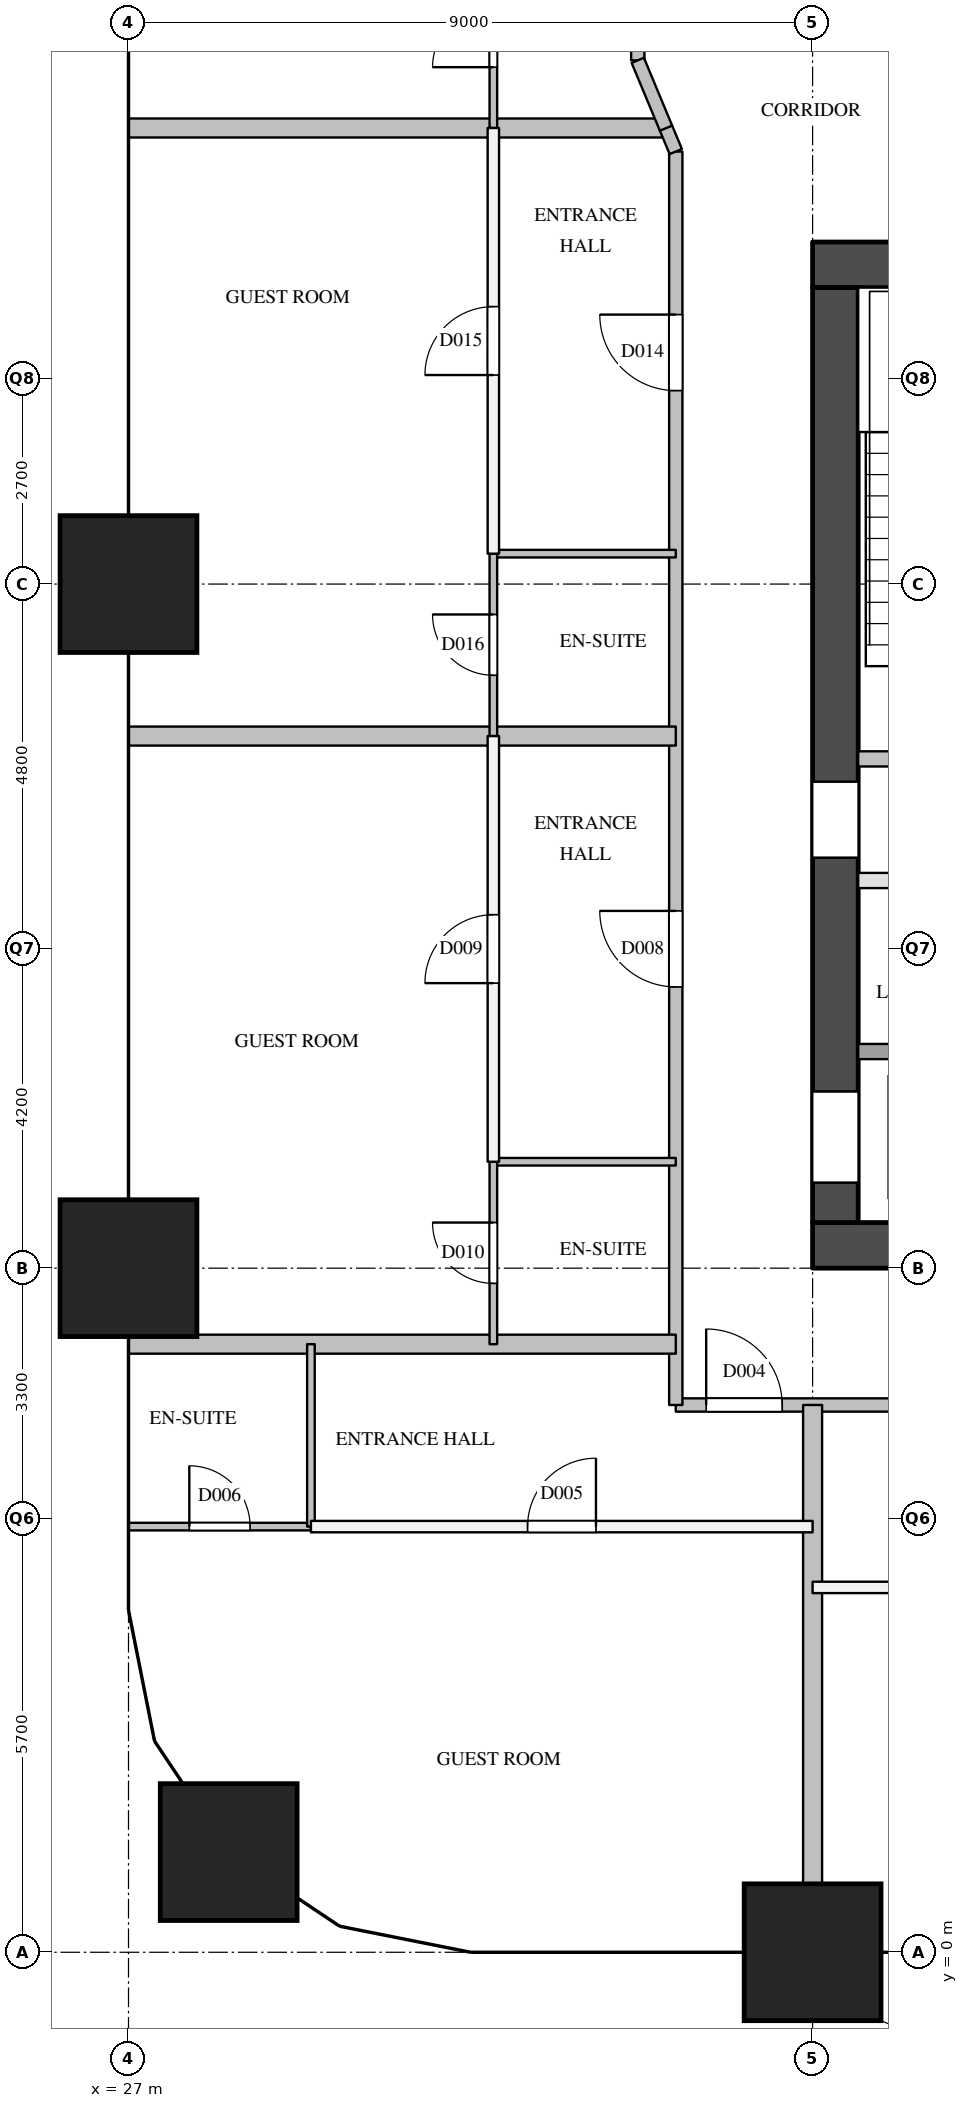
"""IFC4 building model, lengths in metres.
Left out: names, types, materials, properties, quantities, classifications, styles, units other than length and angle.
Written with IfcOpenShell. Run it as: python <this file> out.ifc"""

import sys

from ifc_helpers import new_model, si_unit, direction, frame, frame_2d, origin, origin_2d, place, context, subcontext, project, spatial, rectangle, extrude, element, fill, save


model = new_model("IFC4")
c1 = context("Model", 3, precision=1e-05, world=origin(), true_north=direction((0.0, 1.0)))
c2 = subcontext(c1, "Body", "Model", "MODEL_VIEW")
j1 = project(units=[si_unit("LENGTHUNIT", "METRE"), si_unit("PLANEANGLEUNIT", "RADIAN")], contexts=[c1])
p1 = place(None, origin())
s1 = spatial("IfcSite", under=j1, at=p1, CompositionType="ELEMENT")
p2 = place(p1, origin())
s2 = spatial("IfcBuilding", under=s1, at=p2, CompositionType="ELEMENT")
p3 = place(p2, frame((0.0, 0.0, 108.2)))
s3 = spatial("IfcBuildingStorey", under=s2, at=p3, CompositionType="ELEMENT", Elevation=108.2)
for number, where, z_axis, x_axis in (
    (1, (28.318, 1.318, 0.0), (0.0, 0.0, 1.0), (1.0, 0.0, 0.0)),
    (2, (27.0, 9.0, 0.0), (0.0, 0.0, 1.0), (1.0, 0.0, 0.0)),
    (3, (27.0, 18.0, 0.0), (0.0, 0.0, 1.0), (1.0, 0.0, 0.0)),
    (4, (36.0, 0.0, 0.0), (0.0, 0.0, 1.0), (1.0, 0.0, 0.0)),
):
    element("IfcColumn", number, at=place(p3, frame(where, z_axis=z_axis, x_axis=x_axis)), inside=s3, PredefinedType="COLUMN", context=c2, shape_type="SweptSolid", body=[
        extrude(rectangle(XDim=1.8, YDim=1.8, at=origin_2d()), origin(), (0.0, 0.0, 1.0), 3.8),
    ])
for number, where, z_axis, x_axis in (
    (5, (36.0, 9.3, 0.0), (0.0, 0.0, 1.0), (1.0, 0.0, 0.0)),
    (6, (36.0, 22.2, 0.0), (0.0, 0.0, 1.0), (1.0, 0.0, 0.0)),
):
    element("IfcWall", number, at=place(p3, frame(where, z_axis=z_axis, x_axis=x_axis)), inside=s3, PredefinedType="SHEAR", context=c2, shape_type="SweptSolid", body=[
        extrude(rectangle(XDim=9.0, YDim=0.6, at=frame_2d((4.5, 0.0))), origin(), (0.0, 0.0, 1.0), 3.5),
    ])
p4 = place(p3, frame((36.3, 9.6, 0.0), z_axis=(0.0, 0.0, 1.0), x_axis=(0.0, 1.0, 0.0)))
e7 = element("IfcWall", 7, at=p4, inside=s3, PredefinedType="SHEAR", context=c2, shape_type="SweptSolid", body=[
    extrude(rectangle(XDim=12.3, YDim=0.6, at=frame_2d((6.15, 0.0))), origin(), (0.0, 0.0, 1.0), 3.5),
])
p5 = place(p4, frame((0.525, 0.0, 0.0)))
e8 = element("IfcOpeningElement", 8, at=p5, cuts=e7, PredefinedType="OPENING", context=c2, shape_type="SweptSolid", body=[
    extrude(rectangle(XDim=1.2, YDim=2.1, at=frame_2d((0.6, 1.05))), frame((0.0, 0.31, 0.0), z_axis=(0.0, -1.0, 0.0), x_axis=(1.0, 0.0, 0.0)), (0.0, 0.0, 1.0), 0.62),
])
p6 = place(p4, frame((4.8, 0.0, 0.0)))
e9 = element("IfcOpeningElement", 9, at=p6, cuts=e7, PredefinedType="OPENING", context=c2, shape_type="SweptSolid", body=[
    extrude(rectangle(XDim=1.0, YDim=2.1, at=frame_2d((0.5, 1.05))), frame((0.0, 0.31, 0.0), z_axis=(0.0, -1.0, 0.0), x_axis=(1.0, 0.0, 0.0)), (0.0, 0.0, 1.0), 0.62),
])
p7 = place(p3, frame((36.6, 11.85, 0.0), z_axis=(0.0, 0.0, 1.0), x_axis=(1.0, 0.0, 0.0)))
e10 = element("IfcWall", 10, at=p7, inside=s3, PredefinedType="SOLIDWALL", context=c2, shape_type="SweptSolid", body=[
    extrude(rectangle(XDim=7.8, YDim=0.2, at=frame_2d((3.9, 0.0))), origin(), (0.0, 0.0, 1.0), 3.5),
])
p8 = place(p3, frame((36.6, 14.1, 0.0), z_axis=(0.0, 0.0, 1.0), x_axis=(1.0, 0.0, 0.0)))
e11 = element("IfcWall", 11, at=p8, inside=s3, PredefinedType="PARTITIONING", context=c2, shape_type="SweptSolid", body=[
    extrude(rectangle(XDim=6.0, YDim=0.2, at=frame_2d((3.0, 0.0))), origin(), (0.0, 0.0, 1.0), 3.5),
])
p9 = place(p8, frame((0.9, 0.0, 0.0)))
e12 = element("IfcOpeningElement", 12, at=p9, cuts=e11, PredefinedType="OPENING", context=c2, shape_type="SweptSolid", body=[
    extrude(rectangle(XDim=0.9, YDim=2.1, at=frame_2d((0.45, 1.05))), frame((0.0, 0.11, 0.0), z_axis=(0.0, -1.0, 0.0), x_axis=(1.0, 0.0, 0.0)), (0.0, 0.0, 1.0), 0.22),
])
p10 = place(p8, frame((3.9, 0.0, 0.0)))
e13 = element("IfcOpeningElement", 13, at=p10, cuts=e11, PredefinedType="OPENING", context=c2, shape_type="SweptSolid", body=[
    extrude(rectangle(XDim=0.9, YDim=2.1, at=frame_2d((0.45, 1.05))), frame((0.0, 0.11, 0.0), z_axis=(0.0, -1.0, 0.0), x_axis=(1.0, 0.0, 0.0)), (0.0, 0.0, 1.0), 0.22),
])
p11 = place(p3, frame((36.6, 15.7, 0.0), z_axis=(0.0, 0.0, 1.0), x_axis=(1.0, 0.0, 0.0)))
e14 = element("IfcWall", 14, at=p11, inside=s3, PredefinedType="SOLIDWALL", context=c2, shape_type="SweptSolid", body=[
    extrude(rectangle(XDim=6.3, YDim=0.2, at=frame_2d((3.15, 0.0))), origin(), (0.0, 0.0, 1.0), 3.5),
])
p12 = place(p11, frame((1.025, 0.0, 0.0)))
e15 = element("IfcOpeningElement", 15, at=p12, cuts=e14, PredefinedType="OPENING", context=c2, shape_type="SweptSolid", body=[
    extrude(rectangle(XDim=1.1, YDim=2.1, at=frame_2d((0.55, 1.05))), frame((0.0, 0.11, 0.0), z_axis=(0.0, -1.0, 0.0), x_axis=(1.0, 0.0, 0.0)), (0.0, 0.0, 1.0), 0.22),
])
p13 = place(p11, frame((4.175, 0.0, 0.0)))
e16 = element("IfcOpeningElement", 16, at=p13, cuts=e14, PredefinedType="OPENING", context=c2, shape_type="SweptSolid", body=[
    extrude(rectangle(XDim=1.1, YDim=2.1, at=frame_2d((0.55, 1.05))), frame((0.0, 0.11, 0.0), z_axis=(0.0, -1.0, 0.0), x_axis=(1.0, 0.0, 0.0)), (0.0, 0.0, 1.0), 0.22),
])
p14 = place(p3, frame((34.2, 7.2, 0.0), z_axis=(0.0, 0.0, 1.0), x_axis=(1.0, 0.0, 0.0)))
e17 = element("IfcWall", 17, at=p14, inside=s3, PredefinedType="PARTITIONING", context=c2, shape_type="SweptSolid", body=[
    extrude(rectangle(XDim=12.6, YDim=0.175, at=frame_2d((6.3, 0.0))), origin(), (0.0, 0.0, 1.0), 3.5),
])
p15 = place(p14, frame((4.1, 0.0, 0.0)))
e18 = element("IfcOpeningElement", 18, at=p15, cuts=e17, PredefinedType="OPENING", context=c2, shape_type="SweptSolid", body=[
    extrude(rectangle(XDim=1.0, YDim=2.1, at=frame_2d((0.5, 1.05))), frame((0.0, 0.097, 0.0), z_axis=(0.0, -1.0, 0.0), x_axis=(1.0, 0.0, 0.0)), (0.0, 0.0, 1.0), 0.195),
])
p16 = place(p14, frame((0.4, 0.0, 0.0)))
e19 = element("IfcOpeningElement", 19, at=p16, cuts=e17, PredefinedType="OPENING", context=c2, shape_type="SweptSolid", body=[
    extrude(rectangle(XDim=1.0, YDim=2.1, at=frame_2d((0.5, 1.05))), frame((0.0, 0.097, 0.0), z_axis=(0.0, -1.0, 0.0), x_axis=(1.0, 0.0, 0.0)), (0.0, 0.0, 1.0), 0.195),
])
p17 = place(p3, frame((33.7, 24.89, 0.0), z_axis=(0.0, 0.0, 1.0), x_axis=(0.0, 1.0, 0.0)))
e20 = element("IfcWall", 20, at=p17, inside=s3, PredefinedType="PARTITIONING", context=c2, shape_type="SweptSolid", body=[
    extrude(rectangle(XDim=3.03, YDim=0.175, at=frame_2d((1.515, 0.0))), origin(), (0.0, 0.0, 1.0), 2.5),
])
p18 = place(p3, frame((34.2, 7.2, 0.0), z_axis=(0.0, 0.0, 1.0), x_axis=(0.0, 1.0, 0.0)))
e21 = element("IfcWall", 21, at=p18, inside=s3, PredefinedType="PARTITIONING", context=c2, shape_type="SweptSolid", body=[
    extrude(rectangle(XDim=16.49, YDim=0.175, at=frame_2d((8.245, 0.0))), origin(), (0.0, 0.0, 1.0), 3.5),
])
p19 = place(p18, frame((5.5, 0.0, 0.0)))
e22 = element("IfcOpeningElement", 22, at=p19, cuts=e21, PredefinedType="OPENING", context=c2, shape_type="SweptSolid", body=[
    extrude(rectangle(XDim=1.0, YDim=2.1, at=frame_2d((0.5, 1.05))), frame((0.0, 0.097, 0.0), z_axis=(0.0, -1.0, 0.0), x_axis=(1.0, 0.0, 0.0)), (0.0, 0.0, 1.0), 0.195),
])
p20 = place(p18, frame((13.345, 0.0, 0.0)))
e23 = element("IfcOpeningElement", 23, at=p20, cuts=e21, PredefinedType="OPENING", context=c2, shape_type="SweptSolid", body=[
    extrude(rectangle(XDim=1.0, YDim=2.1, at=frame_2d((0.5, 1.05))), frame((0.0, 0.097, 0.0), z_axis=(0.0, -1.0, 0.0), x_axis=(1.0, 0.0, 0.0)), (0.0, 0.0, 1.0), 0.195),
])
p21 = place(p3, frame((36.0, 4.8, 0.0), z_axis=(0.0, 0.0, 1.0), x_axis=(1.0, 0.0, 0.0)))
e24 = element("IfcWall", 24, at=p21, inside=s3, PredefinedType="PARTITIONING", context=c2, shape_type="SweptSolid", body=[
    extrude(rectangle(XDim=5.6, YDim=0.15, at=frame_2d((2.8, 0.0))), origin(), (0.0, 0.0, 1.0), 3.5),
])
p22 = place(p21, frame((2.35, 0.0, 0.0)))
e25 = element("IfcOpeningElement", 25, at=p22, cuts=e24, PredefinedType="OPENING", context=c2, shape_type="SweptSolid", body=[
    extrude(rectangle(XDim=0.9, YDim=2.1, at=frame_2d((0.45, 1.05))), frame((0.0, 0.085, 0.0), z_axis=(0.0, -1.0, 0.0), x_axis=(1.0, 0.0, 0.0)), (0.0, 0.0, 1.0), 0.17),
])
p23 = place(p3, frame((29.4, 5.6, 0.0), z_axis=(0.0, 0.0, 1.0), x_axis=(1.0, 0.0, 0.0)))
e26 = element("IfcWall", 26, at=p23, inside=s3, PredefinedType="PARTITIONING", context=c2, shape_type="SweptSolid", body=[
    extrude(rectangle(XDim=6.6, YDim=0.15, at=frame_2d((3.3, 0.0))), origin(), (0.0, 0.0, 1.0), 3.5),
])
p24 = place(p23, frame((2.85, 0.0, 0.0)))
e27 = element("IfcOpeningElement", 27, at=p24, cuts=e26, PredefinedType="OPENING", context=c2, shape_type="SweptSolid", body=[
    extrude(rectangle(XDim=0.9, YDim=2.1, at=frame_2d((0.45, 1.05))), frame((0.0, 0.085, 0.0), z_axis=(0.0, -1.0, 0.0), x_axis=(1.0, 0.0, 0.0)), (0.0, 0.0, 1.0), 0.17),
])
p25 = place(p3, frame((31.8, 10.4, 0.0), z_axis=(0.0, 0.0, 1.0), x_axis=(0.0, 1.0, 0.0)))
e28 = element("IfcWall", 28, at=p25, inside=s3, PredefinedType="PARTITIONING", context=c2, shape_type="SweptSolid", body=[
    extrude(rectangle(XDim=5.6, YDim=0.15, at=frame_2d((2.8, 0.0))), origin(), (0.0, 0.0, 1.0), 3.5),
])
p26 = place(p25, frame((2.35, 0.0, 0.0)))
e29 = element("IfcOpeningElement", 29, at=p26, cuts=e28, PredefinedType="OPENING", context=c2, shape_type="SweptSolid", body=[
    extrude(rectangle(XDim=0.9, YDim=2.1, at=frame_2d((0.45, 1.05))), frame((0.0, 0.085, 0.0), z_axis=(0.0, -1.0, 0.0), x_axis=(1.0, 0.0, 0.0)), (0.0, 0.0, 1.0), 0.17),
])
p27 = place(p3, frame((31.8, 18.4, 0.0), z_axis=(0.0, 0.0, 1.0), x_axis=(0.0, 1.0, 0.0)))
e30 = element("IfcWall", 30, at=p27, inside=s3, PredefinedType="PARTITIONING", context=c2, shape_type="SweptSolid", body=[
    extrude(rectangle(XDim=5.6, YDim=0.15, at=frame_2d((2.8, 0.0))), origin(), (0.0, 0.0, 1.0), 3.5),
])
p28 = place(p27, frame((2.35, 0.0, 0.0)))
e31 = element("IfcOpeningElement", 31, at=p28, cuts=e30, PredefinedType="OPENING", context=c2, shape_type="SweptSolid", body=[
    extrude(rectangle(XDim=0.9, YDim=2.1, at=frame_2d((0.45, 1.05))), frame((0.0, 0.085, 0.0), z_axis=(0.0, -1.0, 0.0), x_axis=(1.0, 0.0, 0.0)), (0.0, 0.0, 1.0), 0.17),
])
for number, where, z_axis, x_axis in (
    (32, (27.0, 8.0, 0.0), (0.0, 0.0, 1.0), (1.0, 0.0, 0.0)),
    (33, (27.0, 16.0, 0.0), (0.0, 0.0, 1.0), (1.0, 0.0, 0.0)),
):
    element("IfcWall", number, at=place(p3, frame(where, z_axis=z_axis, x_axis=x_axis)), inside=s3, PredefinedType="PARTITIONING", context=c2, shape_type="SweptSolid", body=[
        extrude(rectangle(XDim=7.2, YDim=0.25, at=frame_2d((3.6, 0.0))), origin(), (0.0, 0.0, 1.0), 2.5),
    ])
p29 = place(p3, frame((27.0, 24.0, 0.0), z_axis=(0.0, 0.0, 1.0), x_axis=(1.0, 0.0, 0.0)))
e34 = element("IfcWall", 34, at=p29, inside=s3, PredefinedType="PARTITIONING", context=c2, shape_type="SweptSolid", body=[
    extrude(rectangle(XDim=7.071, YDim=0.25, at=frame_2d((3.535, 0.0))), origin(), (0.0, 0.0, 1.0), 2.5),
])
p30 = place(p3, frame((36.0, 0.0, 0.0), z_axis=(0.0, 0.0, 1.0), x_axis=(0.0, 1.0, 0.0)))
e35 = element("IfcWall", 35, at=p30, inside=s3, PredefinedType="PARTITIONING", context=c2, shape_type="SweptSolid", body=[
    extrude(rectangle(XDim=7.2, YDim=0.25, at=frame_2d((3.6, 0.0))), origin(), (0.0, 0.0, 1.0), 3.5),
])
p31 = place(p3, frame((27.0, 5.6, 0.0), z_axis=(0.0, 0.0, 1.0), x_axis=(1.0, 0.0, 0.0)))
e36 = element("IfcWall", 36, at=p31, inside=s3, PredefinedType="PARTITIONING", context=c2, shape_type="SweptSolid", body=[
    extrude(rectangle(XDim=2.4, YDim=0.1, at=frame_2d((1.2, 0.0))), origin(), (0.0, 0.0, 1.0), 2.5),
])
p32 = place(p31, frame((0.8, 0.0, 0.0)))
e37 = element("IfcOpeningElement", 37, at=p32, cuts=e36, PredefinedType="OPENING", context=c2, shape_type="SweptSolid", body=[
    extrude(rectangle(XDim=0.8, YDim=2.1, at=frame_2d((0.4, 1.05))), frame((0.0, 0.06, 0.0), z_axis=(0.0, -1.0, 0.0), x_axis=(1.0, 0.0, 0.0)), (0.0, 0.0, 1.0), 0.12),
])
for number, where, z_axis, x_axis in (
    (38, (31.8, 10.4, 0.0), (0.0, 0.0, 1.0), (1.0, 0.0, 0.0)),
    (39, (31.8, 18.4, 0.0), (0.0, 0.0, 1.0), (1.0, 0.0, 0.0)),
    (40, (29.4, 5.6, 0.0), (0.0, 0.0, 1.0), (0.0, 1.0, 0.0)),
):
    element("IfcWall", number, at=place(p3, frame(where, z_axis=z_axis, x_axis=x_axis)), inside=s3, PredefinedType="PARTITIONING", context=c2, shape_type="SweptSolid", body=[
        extrude(rectangle(XDim=2.4, YDim=0.1, at=frame_2d((1.2, 0.0))), origin(), (0.0, 0.0, 1.0), 3.5),
    ])
p33 = place(p3, frame((31.8, 8.0, 0.0), z_axis=(0.0, 0.0, 1.0), x_axis=(0.0, 1.0, 0.0)))
e41 = element("IfcWall", 41, at=p33, inside=s3, PredefinedType="PARTITIONING", context=c2, shape_type="SweptSolid", body=[
    extrude(rectangle(XDim=2.4, YDim=0.1, at=frame_2d((1.2, 0.0))), origin(), (0.0, 0.0, 1.0), 3.5),
])
p34 = place(p33, frame((0.8, 0.0, 0.0)))
e42 = element("IfcOpeningElement", 42, at=p34, cuts=e41, PredefinedType="OPENING", context=c2, shape_type="SweptSolid", body=[
    extrude(rectangle(XDim=0.8, YDim=2.1, at=frame_2d((0.4, 1.05))), frame((0.0, 0.06, 0.0), z_axis=(0.0, -1.0, 0.0), x_axis=(1.0, 0.0, 0.0)), (0.0, 0.0, 1.0), 0.12),
])
p35 = place(p3, frame((31.8, 16.0, 0.0), z_axis=(0.0, 0.0, 1.0), x_axis=(0.0, 1.0, 0.0)))
e43 = element("IfcWall", 43, at=p35, inside=s3, PredefinedType="PARTITIONING", context=c2, shape_type="SweptSolid", body=[
    extrude(rectangle(XDim=2.4, YDim=0.1, at=frame_2d((1.2, 0.0))), origin(), (0.0, 0.0, 1.0), 3.5),
])
p36 = place(p35, frame((0.8, 0.0, 0.0)))
e44 = element("IfcOpeningElement", 44, at=p36, cuts=e43, PredefinedType="OPENING", context=c2, shape_type="SweptSolid", body=[
    extrude(rectangle(XDim=0.8, YDim=2.1, at=frame_2d((0.4, 1.05))), frame((0.0, 0.06, 0.0), z_axis=(0.0, -1.0, 0.0), x_axis=(1.0, 0.0, 0.0)), (0.0, 0.0, 1.0), 0.12),
])
p37 = place(p3, frame((31.8, 24.0, 0.0), z_axis=(0.0, 0.0, 1.0), x_axis=(0.0, 1.0, 0.0)))
e45 = element("IfcWall", 45, at=p37, inside=s3, PredefinedType="PARTITIONING", context=c2, shape_type="SweptSolid", body=[
    extrude(rectangle(XDim=2.4, YDim=0.1, at=frame_2d((1.2, 0.0))), origin(), (0.0, 0.0, 1.0), 3.5),
])
p38 = place(p37, frame((0.8, 0.0, 0.0)))
e46 = element("IfcOpeningElement", 46, at=p38, cuts=e45, PredefinedType="OPENING", context=c2, shape_type="SweptSolid", body=[
    extrude(rectangle(XDim=0.8, YDim=2.1, at=frame_2d((0.4, 1.05))), frame((0.0, 0.06, 0.0), z_axis=(0.0, -1.0, 0.0), x_axis=(1.0, 0.0, 0.0)), (0.0, 0.0, 1.0), 0.12),
])
p39 = place(p3, frame((34.2, 23.69, 0.0), z_axis=(0.0, 0.0, 1.0), x_axis=(-0.384307602557, 0.92320510539, 0.0)))
e47 = element("IfcWall", 47, at=p39, inside=s3, PredefinedType="PARTITIONING", context=c2, shape_type="SweptSolid", body=[
    extrude(rectangle(XDim=0.338, YDim=0.175, at=frame_2d((0.169, 0.0))), origin(), (0.0, 0.0, 1.0), 3.5),
])
p40 = place(p3, frame((34.072, 23.998, 0.0), z_axis=(0.0, 0.0, 1.0), x_axis=(-0.384687170746, 0.923047008913, 0.0)))
e48 = element("IfcWall", 48, at=p40, inside=s3, PredefinedType="PARTITIONING", context=c2, shape_type="SweptSolid", body=[
    extrude(rectangle(XDim=0.966, YDim=0.175, at=frame_2d((0.483, 0.0))), origin(), (0.0, 0.0, 1.0), 3.5),
])
p41 = place(p5, origin())
e49 = element("IfcDoor", 49, at=p41, inside=s3, OperationType="SLIDING_TO_LEFT", PredefinedType="DOOR", context=c2, shape_type="SweptSolid", body=[
    extrude(rectangle(XDim=1.2, YDim=2.1, at=frame_2d((0.6, 1.05))), frame((0.0, 0.025, 0.0), z_axis=(0.0, -1.0, 0.0), x_axis=(1.0, 0.0, 0.0)), (0.0, 0.0, 1.0), 0.05),
])
fill(e8, e49)
p42 = place(p6, origin())
e50 = element("IfcDoor", 50, at=p42, inside=s3, OperationType="SINGLE_SWING_LEFT", PredefinedType="DOOR", context=c2, shape_type="SweptSolid", body=[
    extrude(rectangle(XDim=1.0, YDim=2.1, at=frame_2d((0.5, 1.05))), frame((0.0, 0.025, 0.0), z_axis=(0.0, -1.0, 0.0), x_axis=(1.0, 0.0, 0.0)), (0.0, 0.0, 1.0), 0.05),
])
fill(e9, e50)
p43 = place(p16, origin())
e51 = element("IfcDoor", 51, at=p43, inside=s3, OperationType="SINGLE_SWING_LEFT", PredefinedType="DOOR", context=c2, shape_type="SweptSolid", body=[
    extrude(rectangle(XDim=1.0, YDim=2.1, at=frame_2d((0.5, 1.05))), frame((0.0, 0.025, 0.0), z_axis=(0.0, -1.0, 0.0), x_axis=(1.0, 0.0, 0.0)), (0.0, 0.0, 1.0), 0.05),
])
fill(e19, e51)
p44 = place(p24, origin())
e52 = element("IfcDoor", 52, at=p44, inside=s3, OperationType="SINGLE_SWING_RIGHT", PredefinedType="DOOR", context=c2, shape_type="SweptSolid", body=[
    extrude(rectangle(XDim=0.9, YDim=2.1, at=frame_2d((0.45, 1.05))), frame((0.0, 0.025, 0.0), z_axis=(0.0, -1.0, 0.0), x_axis=(1.0, 0.0, 0.0)), (0.0, 0.0, 1.0), 0.05),
])
fill(e27, e52)
p45 = place(p32, origin())
e53 = element("IfcDoor", 53, at=p45, inside=s3, OperationType="SINGLE_SWING_LEFT", PredefinedType="DOOR", context=c2, shape_type="SweptSolid", body=[
    extrude(rectangle(XDim=0.8, YDim=2.1, at=frame_2d((0.4, 1.05))), frame((0.0, 0.025, 0.0), z_axis=(0.0, -1.0, 0.0), x_axis=(1.0, 0.0, 0.0)), (0.0, 0.0, 1.0), 0.05),
])
fill(e37, e53)
p46 = place(p19, origin())
e54 = element("IfcDoor", 54, at=p46, inside=s3, OperationType="SINGLE_SWING_RIGHT", PredefinedType="DOOR", context=c2, shape_type="SweptSolid", body=[
    extrude(rectangle(XDim=1.0, YDim=2.1, at=frame_2d((0.5, 1.05))), frame((0.0, 0.025, 0.0), z_axis=(0.0, -1.0, 0.0), x_axis=(1.0, 0.0, 0.0)), (0.0, 0.0, 1.0), 0.05),
])
fill(e22, e54)
p47 = place(p26, origin())
e55 = element("IfcDoor", 55, at=p47, inside=s3, OperationType="SINGLE_SWING_LEFT", PredefinedType="DOOR", context=c2, shape_type="SweptSolid", body=[
    extrude(rectangle(XDim=0.9, YDim=2.1, at=frame_2d((0.45, 1.05))), frame((0.0, 0.025, 0.0), z_axis=(0.0, -1.0, 0.0), x_axis=(1.0, 0.0, 0.0)), (0.0, 0.0, 1.0), 0.05),
])
fill(e29, e55)
p48 = place(p34, origin())
e56 = element("IfcDoor", 56, at=p48, inside=s3, OperationType="SINGLE_SWING_RIGHT", PredefinedType="DOOR", context=c2, shape_type="SweptSolid", body=[
    extrude(rectangle(XDim=0.8, YDim=2.1, at=frame_2d((0.4, 1.05))), frame((0.0, 0.025, 0.0), z_axis=(0.0, -1.0, 0.0), x_axis=(1.0, 0.0, 0.0)), (0.0, 0.0, 1.0), 0.05),
])
fill(e42, e56)
p49 = place(p20, origin())
e57 = element("IfcDoor", 57, at=p49, inside=s3, OperationType="SINGLE_SWING_RIGHT", PredefinedType="DOOR", context=c2, shape_type="SweptSolid", body=[
    extrude(rectangle(XDim=1.0, YDim=2.1, at=frame_2d((0.5, 1.05))), frame((0.0, 0.025, 0.0), z_axis=(0.0, -1.0, 0.0), x_axis=(1.0, 0.0, 0.0)), (0.0, 0.0, 1.0), 0.05),
])
fill(e23, e57)
p50 = place(p28, origin())
e58 = element("IfcDoor", 58, at=p50, inside=s3, OperationType="SINGLE_SWING_LEFT", PredefinedType="DOOR", context=c2, shape_type="SweptSolid", body=[
    extrude(rectangle(XDim=0.9, YDim=2.1, at=frame_2d((0.45, 1.05))), frame((0.0, 0.025, 0.0), z_axis=(0.0, -1.0, 0.0), x_axis=(1.0, 0.0, 0.0)), (0.0, 0.0, 1.0), 0.05),
])
fill(e31, e58)
p51 = place(p36, origin())
e59 = element("IfcDoor", 59, at=p51, inside=s3, OperationType="SINGLE_SWING_RIGHT", PredefinedType="DOOR", context=c2, shape_type="SweptSolid", body=[
    extrude(rectangle(XDim=0.8, YDim=2.1, at=frame_2d((0.4, 1.05))), frame((0.0, 0.025, 0.0), z_axis=(0.0, -1.0, 0.0), x_axis=(1.0, 0.0, 0.0)), (0.0, 0.0, 1.0), 0.05),
])
fill(e44, e59)
p52 = place(p38, origin())
e60 = element("IfcDoor", 60, at=p52, inside=s3, OperationType="SINGLE_SWING_LEFT", PredefinedType="DOOR", context=c2, shape_type="SweptSolid", body=[
    extrude(rectangle(XDim=0.8, YDim=2.1, at=frame_2d((0.4, 1.05))), frame((0.0, 0.025, 0.0), z_axis=(0.0, -1.0, 0.0), x_axis=(1.0, 0.0, 0.0)), (0.0, 0.0, 1.0), 0.05),
])
fill(e46, e60)
save(model, sys.argv[1])
